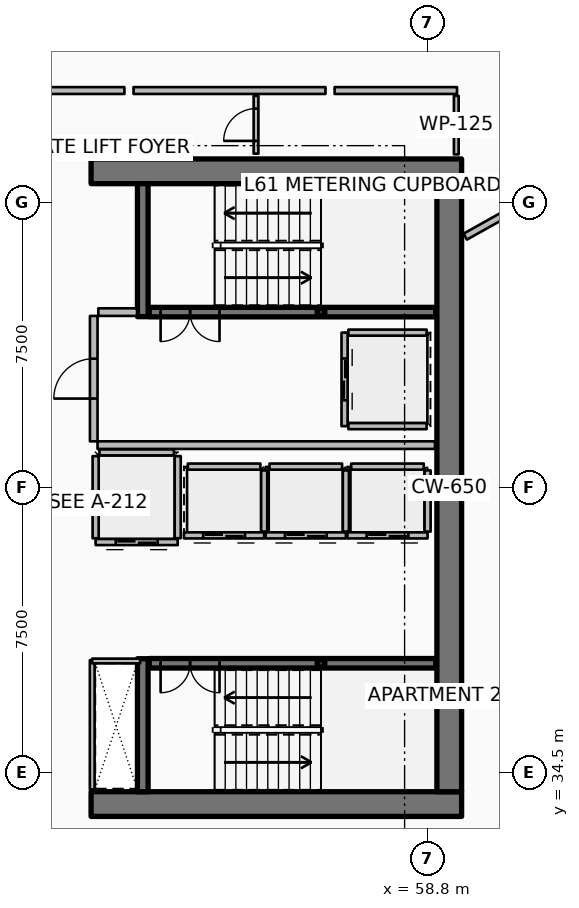
"""IFC4 building model, lengths in metres.
Left out: names, types, materials, properties, quantities, classifications, styles, units other than length and angle.
Written with IfcOpenShell. Run it as: python <this file> out.ifc"""

import sys

from ifc_helpers import new_model, si_unit, direction, frame, frame_2d, origin, origin_2d, place, context, subcontext, project, spatial, rectangle, hollow_rectangle, extrude, element, fill, save


model = new_model("IFC4")
c1 = context("Model", 3, precision=1e-05, world=origin(), true_north=direction((0.0, 1.0)))
c2 = subcontext(c1, "Body", "Model", "MODEL_VIEW")
j1 = project(units=[si_unit("LENGTHUNIT", "METRE"), si_unit("PLANEANGLEUNIT", "RADIAN")], contexts=[c1])
p1 = place(None, origin())
s1 = spatial("IfcSite", under=j1, at=p1, CompositionType="ELEMENT")
p2 = place(p1, origin())
s2 = spatial("IfcBuilding", under=s1, at=p2, CompositionType="ELEMENT")
p3 = place(p2, frame((0.0, 0.0, 244.4)))
s3 = spatial("IfcBuildingStorey", under=s2, at=p3, CompositionType="ELEMENT", Elevation=244.4)
for number, where, z_axis, x_axis in (
    (1, (49.95, 33.675, 0.0), (0.0, 0.0, 1.0), (1.0, 0.0, 0.0)),
    (2, (49.95, 50.325, 0.0), (0.0, 0.0, 1.0), (1.0, 0.0, 0.0)),
):
    element("IfcWall", number, at=place(p3, frame(where, z_axis=z_axis, x_axis=x_axis)), inside=s3, PredefinedType="SHEAR", context=c2, shape_type="SweptSolid", body=[
        extrude(rectangle(XDim=9.75, YDim=0.65, at=frame_2d((4.875, 0.0))), origin(), (0.0, 0.0, 1.0), 3.85),
    ])
p4 = place(p3, frame((59.375, 34.0, 0.0), z_axis=(0.0, 0.0, 1.0), x_axis=(0.0, 1.0, 0.0)))
e3 = element("IfcWall", 3, at=p4, inside=s3, PredefinedType="SHEAR", context=c2, shape_type="SweptSolid", body=[
    extrude(rectangle(XDim=16.0, YDim=0.65, at=frame_2d((8.0, 0.0))), origin(), (0.0, 0.0, 1.0), 3.85),
])
for number, where, z_axis, x_axis in (
    (4, (51.31, 46.5, 0.0), (0.0, 0.0, 1.0), (0.0, 1.0, 0.0)),
    (5, (51.31, 34.0, 0.0), (0.0, 0.0, 1.0), (0.0, 1.0, 0.0)),
):
    element("IfcWall", number, at=place(p3, frame(where, z_axis=z_axis, x_axis=x_axis)), inside=s3, PredefinedType="SHEAR", context=c2, shape_type="SweptSolid", body=[
        extrude(rectangle(XDim=3.5, YDim=0.28, at=frame_2d((1.75, 0.0))), origin(), (0.0, 0.0, 1.0), 3.85),
    ])
for number, where, z_axis, x_axis in (
    (6, (56.0, 46.62, 0.0), (0.0, 0.0, 1.0), (1.0, 0.0, 0.0)),
    (7, (56.0, 37.38, 0.0), (0.0, 0.0, 1.0), (1.0, 0.0, 0.0)),
):
    element("IfcColumn", number, at=place(p3, frame(where, z_axis=z_axis, x_axis=x_axis)), inside=s3, PredefinedType="COLUMN", context=c2, shape_type="SweptSolid", body=[
        extrude(hollow_rectangle(XDim=0.2, YDim=0.2, WallThickness=0.01, InnerFilletRadius=0.01, OuterFilletRadius=0.02, at=origin_2d()), origin(), (0.0, 0.0, 1.0), 1.72),
    ])
p5 = place(p3, frame((51.48, 46.62, 0.0), z_axis=(0.0, 0.0, 1.0), x_axis=(1.0, 0.0, 0.0)))
e8 = element("IfcWall", 8, at=p5, inside=s3, PredefinedType="SOLIDWALL", context=c2, shape_type="SweptSolid", body=[
    extrude(rectangle(XDim=7.54, YDim=0.25, at=frame_2d((3.77, 0.0))), origin(), (0.0, 0.0, 1.0), 3.59),
])
p6 = place(p5, frame((0.3, 0.0, 0.0)))
e9 = element("IfcOpeningElement", 9, at=p6, cuts=e8, PredefinedType="OPENING", context=c2, shape_type="SweptSolid", body=[
    extrude(rectangle(XDim=1.55, YDim=2.15, at=frame_2d((0.775, 1.075))), frame((0.0, 0.135, 0.0), z_axis=(0.0, -1.0, 0.0), x_axis=(1.0, 0.0, 0.0)), (0.0, 0.0, 1.0), 0.27),
])
p7 = place(p3, frame((51.48, 37.38, 0.0), z_axis=(0.0, 0.0, 1.0), x_axis=(1.0, 0.0, 0.0)))
e10 = element("IfcWall", 10, at=p7, inside=s3, PredefinedType="SOLIDWALL", context=c2, shape_type="SweptSolid", body=[
    extrude(rectangle(XDim=7.54, YDim=0.25, at=frame_2d((3.77, 0.0))), origin(), (0.0, 0.0, 1.0), 3.59),
])
p8 = place(p7, frame((0.3, 0.0, 0.0)))
e11 = element("IfcOpeningElement", 11, at=p8, cuts=e10, PredefinedType="OPENING", context=c2, shape_type="SweptSolid", body=[
    extrude(rectangle(XDim=1.55, YDim=2.15, at=frame_2d((0.775, 1.075))), frame((0.0, 0.135, 0.0), z_axis=(0.0, -1.0, 0.0), x_axis=(1.0, 0.0, 0.0)), (0.0, 0.0, 1.0), 0.27),
])
p9 = place(p3, frame((54.505, 40.745, 0.0), z_axis=(0.0, 0.0, 1.0), x_axis=(-1.0, 0.0, 0.0)))
e12 = element("IfcWall", 12, at=p9, inside=s3, PredefinedType="PARTITIONING", context=c2, shape_type="SweptSolid", body=[
    extrude(rectangle(XDim=2.11, YDim=0.16, at=frame_2d((1.055, 0.0))), origin(), (0.0, 0.0, 1.0), 3.59),
])
p10 = place(p9, frame((0.505, 0.0, 0.0)))
e13 = element("IfcOpeningElement", 13, at=p10, cuts=e12, PredefinedType="OPENING", context=c2, shape_type="SweptSolid", body=[
    extrude(rectangle(XDim=1.1, YDim=2.1, at=frame_2d((0.55, 1.05))), frame((0.0, 0.09, 0.0), z_axis=(0.0, -1.0, 0.0), x_axis=(1.0, 0.0, 0.0)), (0.0, 0.0, 1.0), 0.18),
])
p11 = place(p3, frame((54.505, 40.845, 0.0), z_axis=(0.0, 0.0, 1.0), x_axis=(0.0, 1.0, 0.0)))
e14 = element("IfcWall", 14, at=p11, inside=s3, PredefinedType="PARTITIONING", context=c2, shape_type="SweptSolid", body=[
    extrude(rectangle(XDim=1.61, YDim=0.16, at=frame_2d((0.805, 0.0))), origin(), (0.0, 0.0, 1.0), 3.59),
])
p12 = place(p3, frame((52.495, 42.555, 0.0), z_axis=(0.0, 0.0, 1.0), x_axis=(1.0, 0.0, 0.0)))
e15 = element("IfcWall", 15, at=p12, inside=s3, PredefinedType="PARTITIONING", context=c2, shape_type="SweptSolid", body=[
    extrude(rectangle(XDim=1.91, YDim=0.16, at=frame_2d((0.955, 0.0))), origin(), (0.0, 0.0, 1.0), 3.59),
])
p13 = place(p3, frame((56.655, 40.745, 0.0), z_axis=(0.0, 0.0, 1.0), x_axis=(-1.0, 0.0, 0.0)))
e16 = element("IfcWall", 16, at=p13, inside=s3, PredefinedType="PARTITIONING", context=c2, shape_type="SweptSolid", body=[
    extrude(rectangle(XDim=2.11, YDim=0.16, at=frame_2d((1.055, 0.0))), origin(), (0.0, 0.0, 1.0), 3.59),
])
p14 = place(p13, frame((0.505, 0.0, 0.0)))
e17 = element("IfcOpeningElement", 17, at=p14, cuts=e16, PredefinedType="OPENING", context=c2, shape_type="SweptSolid", body=[
    extrude(rectangle(XDim=1.1, YDim=2.1, at=frame_2d((0.55, 1.05))), frame((0.0, 0.09, 0.0), z_axis=(0.0, -1.0, 0.0), x_axis=(1.0, 0.0, 0.0)), (0.0, 0.0, 1.0), 0.18),
])
p15 = place(p3, frame((56.655, 40.845, 0.0), z_axis=(0.0, 0.0, 1.0), x_axis=(0.0, 1.0, 0.0)))
e18 = element("IfcWall", 18, at=p15, inside=s3, PredefinedType="PARTITIONING", context=c2, shape_type="SweptSolid", body=[
    extrude(rectangle(XDim=1.61, YDim=0.16, at=frame_2d((0.805, 0.0))), origin(), (0.0, 0.0, 1.0), 3.59),
])
p16 = place(p3, frame((54.645, 42.555, 0.0), z_axis=(0.0, 0.0, 1.0), x_axis=(1.0, 0.0, 0.0)))
e19 = element("IfcWall", 19, at=p16, inside=s3, PredefinedType="PARTITIONING", context=c2, shape_type="SweptSolid", body=[
    extrude(rectangle(XDim=1.91, YDim=0.16, at=frame_2d((0.955, 0.0))), origin(), (0.0, 0.0, 1.0), 3.59),
])
p17 = place(p3, frame((58.805, 40.745, 0.0), z_axis=(0.0, 0.0, 1.0), x_axis=(-1.0, 0.0, 0.0)))
e20 = element("IfcWall", 20, at=p17, inside=s3, PredefinedType="PARTITIONING", context=c2, shape_type="SweptSolid", body=[
    extrude(rectangle(XDim=2.11, YDim=0.16, at=frame_2d((1.055, 0.0))), origin(), (0.0, 0.0, 1.0), 3.59),
])
p18 = place(p17, frame((0.505, 0.0, 0.0)))
e21 = element("IfcOpeningElement", 21, at=p18, cuts=e20, PredefinedType="OPENING", context=c2, shape_type="SweptSolid", body=[
    extrude(rectangle(XDim=1.1, YDim=2.1, at=frame_2d((0.55, 1.05))), frame((0.0, 0.09, 0.0), z_axis=(0.0, -1.0, 0.0), x_axis=(1.0, 0.0, 0.0)), (0.0, 0.0, 1.0), 0.18),
])
p19 = place(p3, frame((58.805, 40.845, 0.0), z_axis=(0.0, 0.0, 1.0), x_axis=(0.0, 1.0, 0.0)))
e22 = element("IfcWall", 22, at=p19, inside=s3, PredefinedType="PARTITIONING", context=c2, shape_type="SweptSolid", body=[
    extrude(rectangle(XDim=1.61, YDim=0.16, at=frame_2d((0.805, 0.0))), origin(), (0.0, 0.0, 1.0), 3.59),
])
p20 = place(p3, frame((56.795, 42.555, 0.0), z_axis=(0.0, 0.0, 1.0), x_axis=(1.0, 0.0, 0.0)))
e23 = element("IfcWall", 23, at=p20, inside=s3, PredefinedType="PARTITIONING", context=c2, shape_type="SweptSolid", body=[
    extrude(rectangle(XDim=1.91, YDim=0.16, at=frame_2d((0.955, 0.0))), origin(), (0.0, 0.0, 1.0), 3.59),
])
p21 = place(p3, frame((56.62, 46.08, 0.0), z_axis=(0.0, 0.0, 1.0), x_axis=(0.0, -1.0, 0.0)))
e24 = element("IfcWall", 24, at=p21, inside=s3, PredefinedType="PARTITIONING", context=c2, shape_type="SweptSolid", body=[
    extrude(rectangle(XDim=2.46, YDim=0.16, at=frame_2d((1.23, 0.0))), origin(), (0.0, 0.0, 1.0), 3.59),
])
p22 = place(p21, frame((0.68, 0.0, 0.0)))
e25 = element("IfcOpeningElement", 25, at=p22, cuts=e24, PredefinedType="OPENING", context=c2, shape_type="SweptSolid", body=[
    extrude(rectangle(XDim=1.1, YDim=2.1, at=frame_2d((0.55, 1.05))), frame((0.0, 0.09, 0.0), z_axis=(0.0, -1.0, 0.0), x_axis=(1.0, 0.0, 0.0)), (0.0, 0.0, 1.0), 0.18),
])
for number, where, z_axis, x_axis in (
    (26, (56.72, 46.08, 0.0), (0.0, 0.0, 1.0), (1.0, 0.0, 0.0)),
    (27, (56.72, 43.62, 0.0), (0.0, 0.0, 1.0), (1.0, 0.0, 0.0)),
):
    element("IfcWall", number, at=place(p3, frame(where, z_axis=z_axis, x_axis=x_axis)), inside=s3, PredefinedType="PARTITIONING", context=c2, shape_type="SweptSolid", body=[
        extrude(rectangle(XDim=2.06, YDim=0.16, at=frame_2d((1.03, 0.0))), origin(), (0.0, 0.0, 1.0), 3.59),
    ])
p23 = place(p3, frame((52.23, 40.57, 0.0), z_axis=(0.0, 0.0, 1.0), x_axis=(-1.0, 0.0, 0.0)))
e28 = element("IfcWall", 28, at=p23, inside=s3, PredefinedType="PARTITIONING", context=c2, shape_type="SweptSolid", body=[
    extrude(rectangle(XDim=2.16, YDim=0.16, at=frame_2d((1.08, 0.0))), origin(), (0.0, 0.0, 1.0), 3.59),
])
p24 = place(p23, frame((0.53, 0.0, 0.0)))
e29 = element("IfcOpeningElement", 29, at=p24, cuts=e28, PredefinedType="OPENING", context=c2, shape_type="SweptSolid", body=[
    extrude(rectangle(XDim=1.1, YDim=2.1, at=frame_2d((0.55, 1.05))), frame((0.0, 0.09, 0.0), z_axis=(0.0, -1.0, 0.0), x_axis=(1.0, 0.0, 0.0)), (0.0, 0.0, 1.0), 0.18),
])
for number, where, z_axis, x_axis in (
    (30, (52.23, 40.67, 0.0), (0.0, 0.0, 1.0), (0.0, 1.0, 0.0)),
    (31, (50.07, 40.67, 0.0), (0.0, 0.0, 1.0), (0.0, 1.0, 0.0)),
):
    element("IfcWall", number, at=place(p3, frame(where, z_axis=z_axis, x_axis=x_axis)), inside=s3, PredefinedType="PARTITIONING", context=c2, shape_type="SweptSolid", body=[
        extrude(rectangle(XDim=2.16, YDim=0.16, at=frame_2d((1.08, 0.0))), origin(), (0.0, 0.0, 1.0), 3.59),
    ])
p25 = place(p3, frame((50.17, 42.93, 0.0), z_axis=(0.0, 0.0, 1.0), x_axis=(1.0, 0.0, 0.0)))
e32 = element("IfcWall", 32, at=p25, inside=s3, PredefinedType="PARTITIONING", context=c2, shape_type="SweptSolid", body=[
    extrude(rectangle(XDim=1.96, YDim=0.16, at=frame_2d((0.98, 0.0))), origin(), (0.0, 0.0, 1.0), 3.59),
])
p26 = place(p3, frame((50.12, 43.12, 0.0), z_axis=(0.0, 0.0, 1.0), x_axis=(1.0, 0.0, 0.0)))
e33 = element("IfcWall", 33, at=p26, inside=s3, PredefinedType="PARTITIONING", context=c2, shape_type="SweptSolid", body=[
    extrude(rectangle(XDim=8.88, YDim=0.2, at=frame_2d((4.44, 0.0))), origin(), (0.0, 0.0, 1.0), 3.59),
])
p27 = place(p3, frame((50.14, 46.62, 0.0), z_axis=(0.0, 0.0, 1.0), x_axis=(1.0, 0.0, 0.0)))
e34 = element("IfcWall", 34, at=p27, inside=s3, PredefinedType="PARTITIONING", context=c2, shape_type="SweptSolid", body=[
    extrude(rectangle(XDim=1.02, YDim=0.2, at=frame_2d((0.51, 0.0))), origin(), (0.0, 0.0, 1.0), 3.59),
])
p28 = place(p3, frame((50.02, 43.22, 0.0), z_axis=(0.0, 0.0, 1.0), x_axis=(0.0, 1.0, 0.0)))
e35 = element("IfcWall", 35, at=p28, inside=s3, PredefinedType="PARTITIONING", context=c2, shape_type="SweptSolid", body=[
    extrude(rectangle(XDim=3.3, YDim=0.2, at=frame_2d((1.65, 0.0))), origin(), (0.0, 0.0, 1.0), 3.59),
])
p29 = place(p28, frame((1.125, 0.0, 0.0)))
e36 = element("IfcOpeningElement", 36, at=p29, cuts=e35, PredefinedType="OPENING", context=c2, shape_type="SweptSolid", body=[
    extrude(rectangle(XDim=1.05, YDim=2.1, at=frame_2d((0.525, 1.05))), frame((0.0, 0.11, 0.0), z_axis=(0.0, -1.0, 0.0), x_axis=(1.0, 0.0, 0.0)), (0.0, 0.0, 1.0), 0.22),
])
p30 = place(p3, frame((49.98, 34.06, 0.0), z_axis=(0.0, 0.0, 1.0), x_axis=(0.0, 1.0, 0.0)))
e37 = element("IfcWall", 37, at=p30, inside=s3, PredefinedType="PARTITIONING", context=c2, shape_type="SweptSolid", body=[
    extrude(rectangle(XDim=3.4, YDim=0.125, at=frame_2d((1.7, 0.0))), origin(), (0.0, 0.0, 1.0), 3.03),
])
p31 = place(p3, frame((49.98, 37.44, 0.0), z_axis=(0.0, 0.0, 1.0), x_axis=(1.0, 0.0, 0.0)))
e38 = element("IfcWall", 38, at=p31, inside=s3, PredefinedType="PARTITIONING", context=c2, shape_type="SweptSolid", body=[
    extrude(rectangle(XDim=1.26, YDim=0.125, at=frame_2d((0.63, 0.0))), origin(), (0.0, 0.0, 1.0), 3.03),
])
p32 = place(p3, frame((59.56, 50.77, 0.0), z_axis=(0.0, 0.0, 1.0), x_axis=(0.0, 1.0, 0.0)))
e39 = element("IfcWall", 39, at=p32, inside=s3, PredefinedType="PARTITIONING", context=c2, shape_type="SweptSolid", body=[
    extrude(rectangle(XDim=1.54, YDim=0.125, at=frame_2d((0.77, 0.0))), origin(), (0.0, 0.0, 1.0), 3.03),
])
p33 = place(p3, frame((54.29, 50.79, 0.0), z_axis=(0.0, 0.0, 1.0), x_axis=(0.0, 1.0, 0.0)))
e40 = element("IfcWall", 40, at=p33, inside=s3, PredefinedType="PARTITIONING", context=c2, shape_type="SweptSolid", body=[
    extrude(rectangle(XDim=1.52, YDim=0.125, at=frame_2d((0.76, 0.0))), origin(), (0.0, 0.0, 1.0), 3.03),
])
p34 = place(p33, frame((0.335, 0.0, 0.0)))
e41 = element("IfcOpeningElement", 41, at=p34, cuts=e40, PredefinedType="OPENING", context=c2, shape_type="SweptSolid", body=[
    extrude(rectangle(XDim=0.85, YDim=2.06, at=frame_2d((0.425, 1.03))), frame((0.0, 0.073, 0.0), z_axis=(0.0, -1.0, 0.0), x_axis=(1.0, 0.0, 0.0)), (0.0, 0.0, 1.0), 0.145),
])
p35 = place(p3, frame((59.796, 48.606, 0.0), z_axis=(0.0, 0.0, 1.0), x_axis=(0.872493213488, 0.488626229767, 0.0)))
e42 = element("IfcWall", 42, at=p35, inside=s3, PredefinedType="PARTITIONING", context=c2, shape_type="SweptSolid", body=[
    extrude(rectangle(XDim=16.91, YDim=0.18, at=frame_2d((8.455, 0.0))), origin(), (0.0, 0.0, 1.0), 2.957),
])
p36 = place(p3, frame((59.58, 52.45, 0.0), z_axis=(0.0, 0.0, 1.0), x_axis=(-1.0, 0.0, 0.0)))
e43 = element("IfcWall", 43, at=p36, inside=s3, PredefinedType="PARTITIONING", context=c2, shape_type="SweptSolid", body=[
    extrude(rectangle(XDim=3.222, YDim=0.18, at=frame_2d((1.611, 0.0))), origin(), (0.0, 0.0, 1.0), 2.957),
])
p37 = place(p3, frame((62.2, 53.031, 0.0), z_axis=(0.0, 0.0, 1.0), x_axis=(-0.660650282497, 0.750693815238, 0.0)))
e44 = element("IfcWall", 44, at=p37, inside=s3, PredefinedType="PARTITIONING", context=c2, shape_type="SweptSolid", body=[
    extrude(rectangle(XDim=2.212, YDim=0.125, at=frame_2d((1.106, 0.0))), origin(), (0.0, 0.0, 1.0), 3.03),
])
p38 = place(p37, frame((0.681, 0.0, 0.0)))
e45 = element("IfcOpeningElement", 45, at=p38, cuts=e44, PredefinedType="OPENING", context=c2, shape_type="SweptSolid", body=[
    extrude(rectangle(XDim=0.85, YDim=2.06, at=frame_2d((0.425, 1.03))), frame((0.0, 0.073, 0.0), z_axis=(0.0, -1.0, 0.0), x_axis=(1.0, 0.0, 0.0)), (0.0, 0.0, 1.0), 0.145),
])
p39 = place(p3, frame((56.118, 52.45, 0.0), z_axis=(0.0, 0.0, 1.0), x_axis=(-1.0, 0.0, 0.0)))
e46 = element("IfcWall", 46, at=p39, inside=s3, PredefinedType="PARTITIONING", context=c2, shape_type="SweptSolid", body=[
    extrude(rectangle(XDim=5.051, YDim=0.18, at=frame_2d((2.525, 0.0))), origin(), (0.0, 0.0, 1.0), 2.957),
])
p40 = place(p3, frame((50.827, 52.45, 0.0), z_axis=(0.0, 0.0, 1.0), x_axis=(-1.0, 0.0, 0.0)))
e47 = element("IfcWall", 47, at=p40, inside=s3, PredefinedType="PARTITIONING", context=c2, shape_type="SweptSolid", body=[
    extrude(rectangle(XDim=3.944, YDim=0.18, at=frame_2d((1.972, 0.0))), origin(), (0.0, 0.0, 1.0), 2.957),
])
p41 = place(p6, origin())
e48 = element("IfcDoor", 48, at=p41, inside=s3, OperationType="DOUBLE_DOOR_SINGLE_SWING", PredefinedType="DOOR", context=c2, shape_type="SweptSolid", body=[
    extrude(rectangle(XDim=1.55, YDim=2.15, at=frame_2d((0.775, 1.075))), frame((0.0, 0.025, 0.0), z_axis=(0.0, -1.0, 0.0), x_axis=(1.0, 0.0, 0.0)), (0.0, 0.0, 1.0), 0.05),
])
fill(e9, e48)
p42 = place(p8, origin())
e49 = element("IfcDoor", 49, at=p42, inside=s3, OperationType="DOUBLE_DOOR_SINGLE_SWING", PredefinedType="DOOR", context=c2, shape_type="SweptSolid", body=[
    extrude(rectangle(XDim=1.55, YDim=2.15, at=frame_2d((0.775, 1.075))), frame((0.0, 0.025, 0.0), z_axis=(0.0, -1.0, 0.0), x_axis=(1.0, 0.0, 0.0)), (0.0, 0.0, 1.0), 0.05),
])
fill(e11, e49)
p43 = place(p10, origin())
e50 = element("IfcDoor", 50, at=p43, inside=s3, OperationType="DOUBLE_DOOR_SLIDING", PredefinedType="DOOR", context=c2, shape_type="SweptSolid", body=[
    extrude(rectangle(XDim=1.1, YDim=2.1, at=frame_2d((0.55, 1.05))), frame((0.0, 0.025, 0.0), z_axis=(0.0, -1.0, 0.0), x_axis=(1.0, 0.0, 0.0)), (0.0, 0.0, 1.0), 0.05),
])
fill(e13, e50)
p44 = place(p14, origin())
e51 = element("IfcDoor", 51, at=p44, inside=s3, OperationType="DOUBLE_DOOR_SLIDING", PredefinedType="DOOR", context=c2, shape_type="SweptSolid", body=[
    extrude(rectangle(XDim=1.1, YDim=2.1, at=frame_2d((0.55, 1.05))), frame((0.0, 0.025, 0.0), z_axis=(0.0, -1.0, 0.0), x_axis=(1.0, 0.0, 0.0)), (0.0, 0.0, 1.0), 0.05),
])
fill(e17, e51)
p45 = place(p18, origin())
e52 = element("IfcDoor", 52, at=p45, inside=s3, OperationType="DOUBLE_DOOR_SLIDING", PredefinedType="DOOR", context=c2, shape_type="SweptSolid", body=[
    extrude(rectangle(XDim=1.1, YDim=2.1, at=frame_2d((0.55, 1.05))), frame((0.0, 0.025, 0.0), z_axis=(0.0, -1.0, 0.0), x_axis=(1.0, 0.0, 0.0)), (0.0, 0.0, 1.0), 0.05),
])
fill(e21, e52)
p46 = place(p22, origin())
e53 = element("IfcDoor", 53, at=p46, inside=s3, OperationType="DOUBLE_DOOR_SLIDING", PredefinedType="DOOR", context=c2, shape_type="SweptSolid", body=[
    extrude(rectangle(XDim=1.1, YDim=2.1, at=frame_2d((0.55, 1.05))), frame((0.0, 0.025, 0.0), z_axis=(0.0, -1.0, 0.0), x_axis=(1.0, 0.0, 0.0)), (0.0, 0.0, 1.0), 0.05),
])
fill(e25, e53)
p47 = place(p24, origin())
e54 = element("IfcDoor", 54, at=p47, inside=s3, OperationType="DOUBLE_DOOR_SLIDING", PredefinedType="DOOR", context=c2, shape_type="SweptSolid", body=[
    extrude(rectangle(XDim=1.1, YDim=2.1, at=frame_2d((0.55, 1.05))), frame((0.0, 0.025, 0.0), z_axis=(0.0, -1.0, 0.0), x_axis=(1.0, 0.0, 0.0)), (0.0, 0.0, 1.0), 0.05),
])
fill(e29, e54)
p48 = place(p29, origin())
e55 = element("IfcDoor", 55, at=p48, inside=s3, OperationType="SINGLE_SWING_LEFT", PredefinedType="DOOR", context=c2, shape_type="SweptSolid", body=[
    extrude(rectangle(XDim=1.05, YDim=2.1, at=frame_2d((0.525, 1.05))), frame((0.0, 0.025, 0.0), z_axis=(0.0, -1.0, 0.0), x_axis=(1.0, 0.0, 0.0)), (0.0, 0.0, 1.0), 0.05),
])
fill(e36, e55)
p49 = place(p34, origin())
e56 = element("IfcDoor", 56, at=p49, inside=s3, OperationType="SINGLE_SWING_LEFT", PredefinedType="DOOR", context=c2, shape_type="SweptSolid", body=[
    extrude(rectangle(XDim=0.85, YDim=2.06, at=frame_2d((0.425, 1.03))), frame((0.0, 0.025, 0.0), z_axis=(0.0, -1.0, 0.0), x_axis=(1.0, 0.0, 0.0)), (0.0, 0.0, 1.0), 0.05),
])
fill(e41, e56)
save(model, sys.argv[1])
